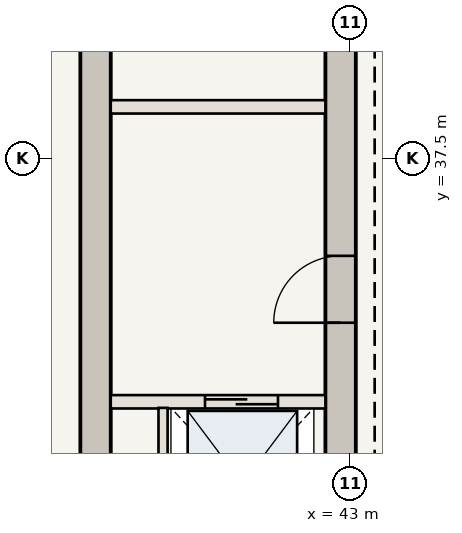
"""IFC4 building model, lengths in metres.
Left out: names, types, materials, properties, quantities, classifications, styles, units other than length and angle.
Written with IfcOpenShell. Run it as: python <this file> out.ifc"""

import sys

from ifc_helpers import new_model, si_unit, direction, frame, frame_2d, origin, place, context, subcontext, project, spatial, rectangle, extrude, element, fill, save


model = new_model("IFC4")
c1 = context("Model", 3, precision=1e-05, world=origin(), true_north=direction((0.0, 1.0)))
c2 = subcontext(c1, "Body", "Model", "MODEL_VIEW")
j1 = project(units=[si_unit("LENGTHUNIT", "METRE"), si_unit("PLANEANGLEUNIT", "RADIAN")], contexts=[c1])
p1 = place(None, origin())
s1 = spatial("IfcSite", under=j1, at=p1, CompositionType="ELEMENT")
p2 = place(p1, origin())
s2 = spatial("IfcBuilding", under=s1, at=p2, CompositionType="ELEMENT")
p3 = place(p2, frame((0.0, 0.0, 217.7)))
s3 = spatial("IfcBuildingStorey", under=s2, at=p3, CompositionType="ELEMENT", Elevation=217.7)
p4 = place(p3, frame((42.84, 30.6, 0.0), z_axis=(0.0, 0.0, 1.0), x_axis=(0.0, 1.0, 0.0)))
e1 = element("IfcWall", 1, at=p4, inside=s3, PredefinedType="SHEAR", context=c2, shape_type="SweptSolid", body=[
    extrude(rectangle(XDim=12.65, YDim=0.5, at=frame_2d((6.325, 0.0))), origin(), (0.0, 0.0, 1.0), 3.85),
])
p5 = place(p4, frame((4.2, 0.0, 0.0)))
e2 = element("IfcOpeningElement", 2, at=p5, cuts=e1, PredefinedType="OPENING", context=c2, shape_type="SweptSolid", body=[
    extrude(rectangle(XDim=1.1, YDim=2.15, at=frame_2d((0.55, 1.075))), frame((0.0, 0.26, 0.0), z_axis=(0.0, -1.0, 0.0), x_axis=(1.0, 0.0, 0.0)), (0.0, 0.0, 1.0), 0.52),
])
p6 = place(p4, frame((9.2, 0.0, 0.0)))
e3 = element("IfcOpeningElement", 3, at=p6, cuts=e1, PredefinedType="OPENING", context=c2, shape_type="SweptSolid", body=[
    extrude(rectangle(XDim=0.92, YDim=2.1, at=frame_2d((0.46, 1.05))), frame((0.0, 0.26, 0.0), z_axis=(0.0, -1.0, 0.0), x_axis=(1.0, 0.0, 0.0)), (0.0, 0.0, 1.0), 0.52),
])
p7 = place(p3, frame((38.81, 30.6, 0.0), z_axis=(0.0, 0.0, 1.0), x_axis=(0.0, 1.0, 0.0)))
e4 = element("IfcWall", 4, at=p7, inside=s3, PredefinedType="SHEAR", context=c2, shape_type="SweptSolid", body=[
    extrude(rectangle(XDim=12.15, YDim=0.5, at=frame_2d((6.075, 0.0))), origin(), (0.0, 0.0, 1.0), 3.85),
])
p8 = place(p3, frame((39.06, 33.5, 0.0), z_axis=(0.0, 0.0, 1.0), x_axis=(1.0, 0.0, 0.0)))
e5 = element("IfcWall", 5, at=p8, inside=s3, PredefinedType="STANDARD", context=c2, shape_type="SweptSolid", body=[
    extrude(rectangle(XDim=3.53, YDim=0.22, at=frame_2d((1.765, 0.0))), origin(), (0.0, 0.0, 1.0), 3.685),
])
p9 = place(p8, frame((1.55, 0.0, 0.0)))
e6 = element("IfcOpeningElement", 6, at=p9, cuts=e5, PredefinedType="OPENING", context=c2, shape_type="SweptSolid", body=[
    extrude(rectangle(XDim=1.2, YDim=2.2, at=frame_2d((0.6, 1.1))), frame((0.0, 0.12, 0.0), z_axis=(0.0, -1.0, 0.0), x_axis=(1.0, 0.0, 0.0)), (0.0, 0.0, 1.0), 0.24),
])
p10 = place(p3, frame((39.92, 30.75, 0.0), z_axis=(0.0, 0.0, 1.0), x_axis=(0.0, 1.0, 0.0)))
e7 = element("IfcWall", 7, at=p10, inside=s3, PredefinedType="STANDARD", context=c2, shape_type="SweptSolid", body=[
    extrude(rectangle(XDim=2.65, YDim=0.15, at=frame_2d((1.325, 0.0))), origin(), (0.0, 0.0, 1.0), 3.685),
])
p11 = place(p3, frame((39.06, 38.35, 0.0), z_axis=(0.0, 0.0, 1.0), x_axis=(1.0, 0.0, 0.0)))
e8 = element("IfcWall", 8, at=p11, inside=s3, PredefinedType="STANDARD", context=c2, shape_type="SweptSolid", body=[
    extrude(rectangle(XDim=3.53, YDim=0.22, at=frame_2d((1.765, 0.0))), origin(), (0.0, 0.0, 1.0), 3.685),
])
p12 = place(p5, origin())
e9 = element("IfcDoor", 9, at=p12, inside=s3, OperationType="SINGLE_SWING_LEFT", PredefinedType="DOOR", context=c2, shape_type="SweptSolid", body=[
    extrude(rectangle(XDim=1.1, YDim=2.15, at=frame_2d((0.55, 1.075))), frame((0.0, 0.025, 0.0), z_axis=(0.0, -1.0, 0.0), x_axis=(1.0, 0.0, 0.0)), (0.0, 0.0, 1.0), 0.05),
])
fill(e2, e9)
p13 = place(p9, origin())
e10 = element("IfcDoor", 10, at=p13, inside=s3, OperationType="DOUBLE_DOOR_SLIDING", PredefinedType="DOOR", context=c2, shape_type="SweptSolid", body=[
    extrude(rectangle(XDim=1.2, YDim=2.2, at=frame_2d((0.6, 1.1))), frame((0.0, 0.025, 0.0), z_axis=(0.0, -1.0, 0.0), x_axis=(1.0, 0.0, 0.0)), (0.0, 0.0, 1.0), 0.05),
])
fill(e6, e10)
save(model, sys.argv[1])
